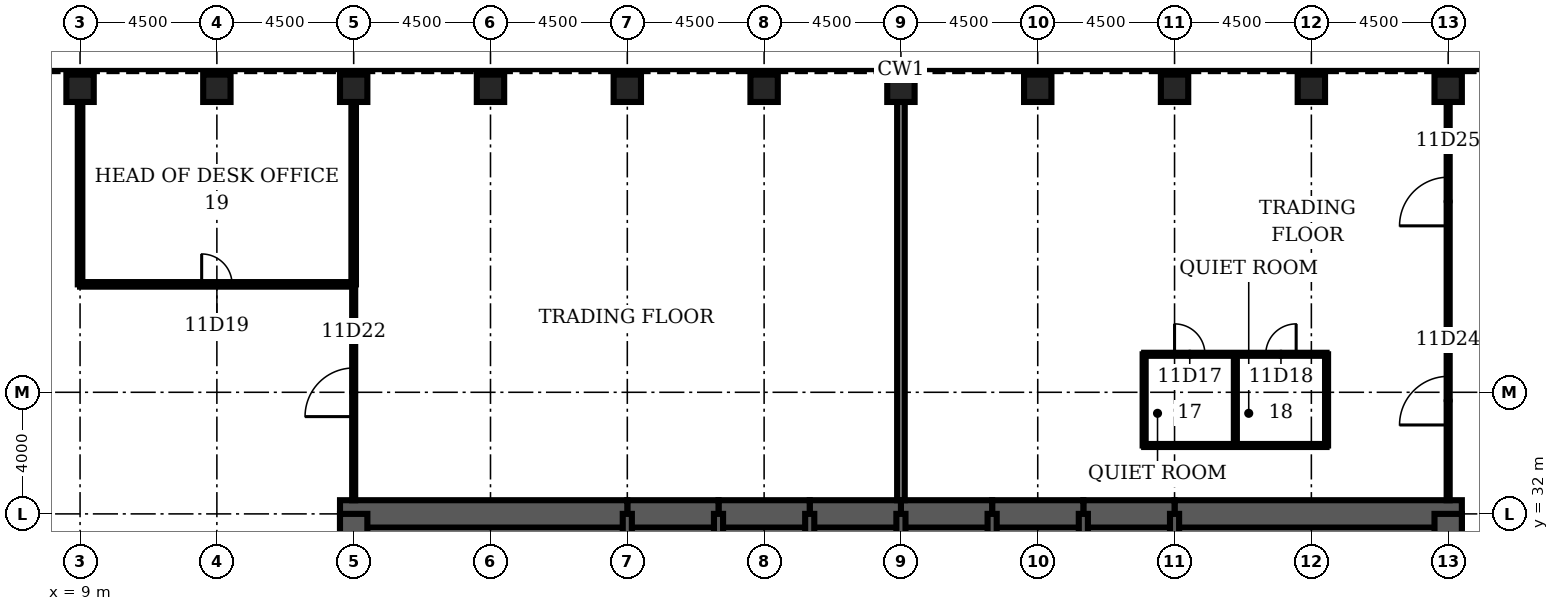
"""IFC4 building model, lengths in metres.
Left out: names, types, materials, properties, quantities, classifications, styles, units other than length and angle.
Written with IfcOpenShell. Run it as: python <this file> out.ifc"""

import sys

from ifc_helpers import new_model, si_unit, direction, frame, frame_2d, origin, origin_2d, place, context, subcontext, project, spatial, rectangle, hollow_rectangle, extrude, element, fill, save


model = new_model("IFC4")
c1 = context("Model", 3, precision=1e-05, world=origin(), true_north=direction((0.0, 1.0)))
c2 = subcontext(c1, "Body", "Model", "MODEL_VIEW")
j1 = project(units=[si_unit("LENGTHUNIT", "METRE"), si_unit("PLANEANGLEUNIT", "RADIAN")], contexts=[c1])
p1 = place(None, origin())
s1 = spatial("IfcSite", under=j1, at=p1, CompositionType="ELEMENT")
p2 = place(p1, origin())
s2 = spatial("IfcBuilding", under=s1, at=p2, CompositionType="ELEMENT")
p3 = place(p2, frame((0.0, 0.0, 54.5)))
s3 = spatial("IfcBuildingStorey", under=s2, at=p3, CompositionType="ELEMENT", Elevation=54.5)
for number, where, z_axis, x_axis in (
    (1, (54.0, 46.0, 0.0), (0.0, 0.0, 1.0), (0.0, 1.0, 0.0)),
    (2, (49.5, 46.0, 0.0), (0.0, 0.0, 1.0), (0.0, 1.0, 0.0)),
    (3, (45.0, 46.0, 0.0), (0.0, 0.0, 1.0), (0.0, 1.0, 0.0)),
    (4, (40.5, 46.0, 0.0), (0.0, 0.0, 1.0), (0.0, 1.0, 0.0)),
    (5, (36.0, 46.0, 0.0), (0.0, 0.0, 1.0), (0.0, 1.0, 0.0)),
    (6, (31.5, 46.0, 0.0), (0.0, 0.0, 1.0), (0.0, 1.0, 0.0)),
    (7, (27.0, 46.0, 0.0), (0.0, 0.0, 1.0), (0.0, 1.0, 0.0)),
    (8, (22.5, 46.0, 0.0), (0.0, 0.0, 1.0), (0.0, 1.0, 0.0)),
    (9, (18.0, 46.0, 0.0), (0.0, 0.0, 1.0), (0.0, 1.0, 0.0)),
    (10, (13.5, 46.0, 0.0), (0.0, 0.0, 1.0), (0.0, 1.0, 0.0)),
    (11, (9.0, 46.0, 0.0), (0.0, 0.0, 1.0), (0.0, 1.0, 0.0)),
):
    element("IfcColumn", number, at=place(p3, frame(where, z_axis=z_axis, x_axis=x_axis)), inside=s3, PredefinedType="COLUMN", context=c2, shape_type="SweptSolid", body=[
        extrude(hollow_rectangle(XDim=0.9, YDim=0.9, WallThickness=0.12, at=origin_2d()), origin(), (0.0, 0.0, 1.0), 4.5),
    ])
p4 = place(p3, frame((54.45, 32.0, 0.0), z_axis=(0.0, 0.0, 1.0), x_axis=(-1.0, 0.0, 0.0)))
e12 = element("IfcWall", 12, at=p4, inside=s3, PredefinedType="SHEAR", context=c2, shape_type="SweptSolid", body=[
    extrude(rectangle(XDim=9.45, YDim=0.9, at=frame_2d((4.725, 0.0))), origin(), (0.0, 0.0, 1.0), 4.5),
])
for number, where, z_axis, x_axis in (
    (13, (45.0, 32.0, 0.0), (0.0, 0.0, 1.0), (-1.0, 0.0, 0.0)),
    (14, (42.0, 32.0, 0.0), (0.0, 0.0, 1.0), (-1.0, 0.0, 0.0)),
    (15, (39.0, 32.0, 0.0), (0.0, 0.0, 1.0), (-1.0, 0.0, 0.0)),
    (16, (36.0, 32.0, 0.0), (0.0, 0.0, 1.0), (-1.0, 0.0, 0.0)),
    (17, (33.0, 32.0, 0.0), (0.0, 0.0, 1.0), (-1.0, 0.0, 0.0)),
    (18, (30.0, 32.0, 0.0), (0.0, 0.0, 1.0), (-1.0, 0.0, 0.0)),
):
    element("IfcWall", number, at=place(p3, frame(where, z_axis=z_axis, x_axis=x_axis)), inside=s3, PredefinedType="SHEAR", context=c2, shape_type="SweptSolid", body=[
        extrude(rectangle(XDim=3.0, YDim=0.9, at=frame_2d((1.5, 0.0))), origin(), (0.0, 0.0, 1.0), 4.5),
    ])
p5 = place(p3, frame((27.0, 32.0, 0.0), z_axis=(0.0, 0.0, 1.0), x_axis=(-1.0, 0.0, 0.0)))
e19 = element("IfcWall", 19, at=p5, inside=s3, PredefinedType="SHEAR", context=c2, shape_type="SweptSolid", body=[
    extrude(rectangle(XDim=9.45, YDim=0.9, at=frame_2d((4.725, 0.0))), origin(), (0.0, 0.0, 1.0), 4.5),
])
for number, where, z_axis, x_axis in (
    (20, (18.0, 32.0, 0.0), (0.0, 0.0, 1.0), (0.0, -1.0, 0.0)),
    (21, (54.0, 28.8, 0.0), (0.0, 0.0, 1.0), (0.0, 1.0, 0.0)),
):
    element("IfcWall", number, at=place(p3, frame(where, z_axis=z_axis, x_axis=x_axis)), inside=s3, PredefinedType="SHEAR", context=c2, shape_type="SweptSolid", body=[
        extrude(rectangle(XDim=3.2, YDim=0.9, at=frame_2d((1.6, 0.0))), origin(), (0.0, 0.0, 1.0), 4.5),
    ])
for number, where, z_axis, x_axis in (
    (22, (27.0, 28.8, 0.0), (0.0, 0.0, 1.0), (0.0, 1.0, 0.0)),
    (23, (30.0, 28.8, 0.0), (0.0, 0.0, 1.0), (0.0, 1.0, 0.0)),
    (24, (33.0, 28.8, 0.0), (0.0, 0.0, 1.0), (0.0, 1.0, 0.0)),
    (25, (36.0, 28.8, 0.0), (0.0, 0.0, 1.0), (0.0, 1.0, 0.0)),
    (26, (39.0, 28.8, 0.0), (0.0, 0.0, 1.0), (0.0, 1.0, 0.0)),
    (27, (42.0, 28.8, 0.0), (0.0, 0.0, 1.0), (0.0, 1.0, 0.0)),
    (28, (45.0, 28.8, 0.0), (0.0, 0.0, 1.0), (0.0, 1.0, 0.0)),
):
    element("IfcWall", number, at=place(p3, frame(where, z_axis=z_axis, x_axis=x_axis)), inside=s3, PredefinedType="SOLIDWALL", context=c2, shape_type="SweptSolid", body=[
        extrude(rectangle(XDim=3.2, YDim=0.3, at=frame_2d((1.6, 0.0))), origin(), (0.0, 0.0, 1.0), 4.5),
    ])
p6 = place(p3, frame((44.0, 34.25, 0.0), z_axis=(0.0, 0.0, 1.0), x_axis=(1.0, 0.0, 0.0)))
e29 = element("IfcWall", 29, at=p6, inside=s3, PredefinedType="PARTITIONING", context=c2, shape_type="SweptSolid", body=[
    extrude(rectangle(XDim=6.0, YDim=0.1, at=frame_2d((3.0, 0.0))), origin(), (0.0, 0.0, 1.0), 3.0),
])
p7 = place(p3, frame((44.0, 37.25, 0.0), z_axis=(0.0, 0.0, 1.0), x_axis=(1.0, 0.0, 0.0)))
e30 = element("IfcWall", 30, at=p7, inside=s3, PredefinedType="PARTITIONING", context=c2, shape_type="SweptSolid", body=[
    extrude(rectangle(XDim=6.0, YDim=0.1, at=frame_2d((3.0, 0.0))), origin(), (0.0, 0.0, 1.0), 3.0),
])
p8 = place(p7, frame((1.0, 0.0, 0.0)))
e31 = element("IfcOpeningElement", 31, at=p8, cuts=e30, PredefinedType="OPENING", context=c2, shape_type="SweptSolid", body=[
    extrude(rectangle(XDim=1.0, YDim=2.1, at=frame_2d((0.5, 1.05))), frame((0.0, 0.06, 0.0), z_axis=(0.0, -1.0, 0.0), x_axis=(1.0, 0.0, 0.0)), (0.0, 0.0, 1.0), 0.12),
])
p9 = place(p7, frame((4.0, 0.0, 0.0)))
e32 = element("IfcOpeningElement", 32, at=p9, cuts=e30, PredefinedType="OPENING", context=c2, shape_type="SweptSolid", body=[
    extrude(rectangle(XDim=1.0, YDim=2.1, at=frame_2d((0.5, 1.05))), frame((0.0, 0.06, 0.0), z_axis=(0.0, -1.0, 0.0), x_axis=(1.0, 0.0, 0.0)), (0.0, 0.0, 1.0), 0.12),
])
p10 = place(p3, frame((9.0, 39.55, 0.0), z_axis=(0.0, 0.0, 1.0), x_axis=(1.0, 0.0, 0.0)))
e33 = element("IfcWall", 33, at=p10, inside=s3, PredefinedType="PARTITIONING", context=c2, shape_type="SweptSolid", body=[
    extrude(rectangle(XDim=9.0, YDim=0.15, at=frame_2d((4.5, 0.0))), origin(), (0.0, 0.0, 1.0), 3.0),
])
p11 = place(p10, frame((4.0, 0.0, 0.0)))
e34 = element("IfcOpeningElement", 34, at=p11, cuts=e33, PredefinedType="OPENING", context=c2, shape_type="SweptSolid", body=[
    extrude(rectangle(XDim=1.0, YDim=2.1, at=frame_2d((0.5, 1.05))), frame((0.0, 0.085, 0.0), z_axis=(0.0, -1.0, 0.0), x_axis=(1.0, 0.0, 0.0)), (0.0, 0.0, 1.0), 0.17),
])
p12 = place(p3, frame((9.0, 39.55, 0.0), z_axis=(0.0, 0.0, 1.0), x_axis=(0.0, 1.0, 0.0)))
e35 = element("IfcWall", 35, at=p12, inside=s3, PredefinedType="PARTITIONING", context=c2, shape_type="SweptSolid", body=[
    extrude(rectangle(XDim=6.0, YDim=0.15, at=frame_2d((3.0, 0.0))), origin(), (0.0, 0.0, 1.0), 3.0),
])
p13 = place(p3, frame((18.0, 32.45, 0.0), z_axis=(0.0, 0.0, 1.0), x_axis=(0.0, 1.0, 0.0)))
e36 = element("IfcWall", 36, at=p13, inside=s3, PredefinedType="PARTITIONING", context=c2, shape_type="SweptSolid", body=[
    extrude(rectangle(XDim=7.1, YDim=0.1, at=frame_2d((3.55, 0.0))), origin(), (0.0, 0.0, 1.0), 3.0),
])
p14 = place(p13, frame((2.75, 0.0, 0.0)))
e37 = element("IfcOpeningElement", 37, at=p14, cuts=e36, PredefinedType="OPENING", context=c2, shape_type="SweptSolid", body=[
    extrude(rectangle(XDim=1.6, YDim=2.1, at=frame_2d((0.8, 1.05))), frame((0.0, 0.06, 0.0), z_axis=(0.0, -1.0, 0.0), x_axis=(1.0, 0.0, 0.0)), (0.0, 0.0, 1.0), 0.12),
])
p15 = place(p3, frame((18.0, 39.55, 0.0), z_axis=(0.0, 0.0, 1.0), x_axis=(0.0, 1.0, 0.0)))
e38 = element("IfcWall", 38, at=p15, inside=s3, PredefinedType="PARTITIONING", context=c2, shape_type="SweptSolid", body=[
    extrude(rectangle(XDim=6.0, YDim=0.15, at=frame_2d((3.0, 0.0))), origin(), (0.0, 0.0, 1.0), 3.0),
])
p16 = place(p3, frame((36.0, 32.45, 0.0), z_axis=(0.0, 0.0, 1.0), x_axis=(0.0, 1.0, 0.0)))
e39 = element("IfcWall", 39, at=p16, inside=s3, PredefinedType="PARTITIONING", context=c2, shape_type="SweptSolid", body=[
    extrude(rectangle(XDim=13.1, YDim=0.25, at=frame_2d((6.55, 0.0))), origin(), (0.0, 0.0, 1.0), 3.0),
])
for number, where, z_axis, x_axis in (
    (40, (44.0, 34.25, 0.0), (0.0, 0.0, 1.0), (0.0, 1.0, 0.0)),
    (41, (47.0, 34.25, 0.0), (0.0, 0.0, 1.0), (0.0, 1.0, 0.0)),
    (42, (50.0, 34.25, 0.0), (0.0, 0.0, 1.0), (0.0, 1.0, 0.0)),
):
    element("IfcWall", number, at=place(p3, frame(where, z_axis=z_axis, x_axis=x_axis)), inside=s3, PredefinedType="PARTITIONING", context=c2, shape_type="SweptSolid", body=[
        extrude(rectangle(XDim=3.0, YDim=0.1, at=frame_2d((1.5, 0.0))), origin(), (0.0, 0.0, 1.0), 3.0),
    ])
p17 = place(p3, frame((54.0, 32.45, 0.0), z_axis=(0.0, 0.0, 1.0), x_axis=(0.0, 1.0, 0.0)))
e43 = element("IfcWall", 43, at=p17, inside=s3, PredefinedType="PARTITIONING", context=c2, shape_type="SweptSolid", body=[
    extrude(rectangle(XDim=13.1, YDim=0.1, at=frame_2d((6.55, 0.0))), origin(), (0.0, 0.0, 1.0), 3.0),
])
p18 = place(p17, frame((2.475, 0.0, 0.0)))
e44 = element("IfcOpeningElement", 44, at=p18, cuts=e43, PredefinedType="OPENING", context=c2, shape_type="SweptSolid", body=[
    extrude(rectangle(XDim=1.6, YDim=2.1, at=frame_2d((0.8, 1.05))), frame((0.0, 0.06, 0.0), z_axis=(0.0, -1.0, 0.0), x_axis=(1.0, 0.0, 0.0)), (0.0, 0.0, 1.0), 0.12),
])
p19 = place(p17, frame((9.025, 0.0, 0.0)))
e45 = element("IfcOpeningElement", 45, at=p19, cuts=e43, PredefinedType="OPENING", context=c2, shape_type="SweptSolid", body=[
    extrude(rectangle(XDim=1.6, YDim=2.1, at=frame_2d((0.8, 1.05))), frame((0.0, 0.06, 0.0), z_axis=(0.0, -1.0, 0.0), x_axis=(1.0, 0.0, 0.0)), (0.0, 0.0, 1.0), 0.12),
])
p20 = place(p8, origin())
e46 = element("IfcDoor", 46, at=p20, inside=s3, OperationType="SINGLE_SWING_LEFT", PredefinedType="DOOR", context=c2, shape_type="SweptSolid", body=[
    extrude(rectangle(XDim=1.0, YDim=2.1, at=frame_2d((0.5, 1.05))), frame((0.0, 0.025, 0.0), z_axis=(0.0, -1.0, 0.0), x_axis=(1.0, 0.0, 0.0)), (0.0, 0.0, 1.0), 0.05),
])
fill(e31, e46)
p21 = place(p9, origin())
e47 = element("IfcDoor", 47, at=p21, inside=s3, OperationType="SINGLE_SWING_RIGHT", PredefinedType="DOOR", context=c2, shape_type="SweptSolid", body=[
    extrude(rectangle(XDim=1.0, YDim=2.1, at=frame_2d((0.5, 1.05))), frame((0.0, 0.025, 0.0), z_axis=(0.0, -1.0, 0.0), x_axis=(1.0, 0.0, 0.0)), (0.0, 0.0, 1.0), 0.05),
])
fill(e32, e47)
p22 = place(p11, origin())
e48 = element("IfcDoor", 48, at=p22, inside=s3, OperationType="SINGLE_SWING_LEFT", PredefinedType="DOOR", context=c2, shape_type="SweptSolid", body=[
    extrude(rectangle(XDim=1.0, YDim=2.1, at=frame_2d((0.5, 1.05))), frame((0.0, 0.025, 0.0), z_axis=(0.0, -1.0, 0.0), x_axis=(1.0, 0.0, 0.0)), (0.0, 0.0, 1.0), 0.05),
])
fill(e34, e48)
p23 = place(p14, origin())
e49 = element("IfcDoor", 49, at=p23, inside=s3, OperationType="SINGLE_SWING_LEFT", PredefinedType="DOOR", context=c2, shape_type="SweptSolid", body=[
    extrude(rectangle(XDim=1.6, YDim=2.1, at=frame_2d((0.8, 1.05))), frame((0.0, 0.025, 0.0), z_axis=(0.0, -1.0, 0.0), x_axis=(1.0, 0.0, 0.0)), (0.0, 0.0, 1.0), 0.05),
])
fill(e37, e49)
p24 = place(p18, origin())
e50 = element("IfcDoor", 50, at=p24, inside=s3, OperationType="SINGLE_SWING_LEFT", PredefinedType="DOOR", context=c2, shape_type="SweptSolid", body=[
    extrude(rectangle(XDim=1.6, YDim=2.1, at=frame_2d((0.8, 1.05))), frame((0.0, 0.025, 0.0), z_axis=(0.0, -1.0, 0.0), x_axis=(1.0, 0.0, 0.0)), (0.0, 0.0, 1.0), 0.05),
])
fill(e44, e50)
p25 = place(p19, origin())
e51 = element("IfcDoor", 51, at=p25, inside=s3, OperationType="SINGLE_SWING_LEFT", PredefinedType="DOOR", context=c2, shape_type="SweptSolid", body=[
    extrude(rectangle(XDim=1.6, YDim=2.1, at=frame_2d((0.8, 1.05))), frame((0.0, 0.025, 0.0), z_axis=(0.0, -1.0, 0.0), x_axis=(1.0, 0.0, 0.0)), (0.0, 0.0, 1.0), 0.05),
])
fill(e45, e51)
save(model, sys.argv[1])
